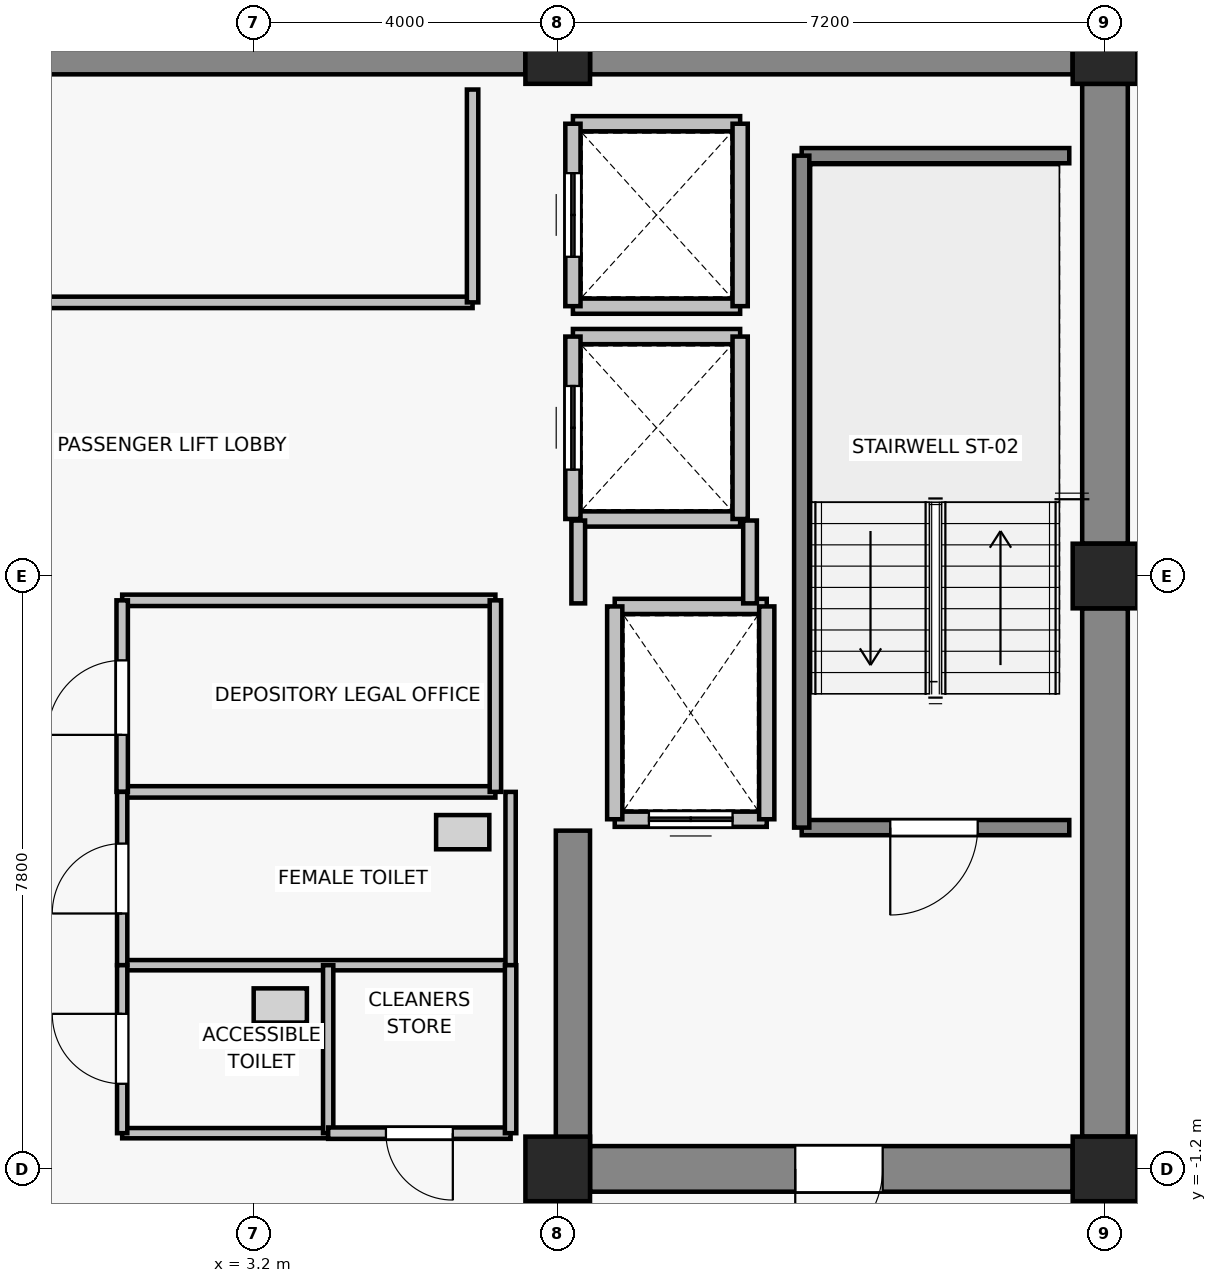
"""IFC4 building model, lengths in metres.
Left out: names, types, materials, properties, quantities, classifications, styles, units other than length and angle.
Written with IfcOpenShell. Run it as: python <this file> out.ifc"""

import sys

from ifc_helpers import new_model, si_unit, direction, frame, frame_2d, origin, origin_2d, place, context, subcontext, project, spatial, rectangle, extrude, source, transform, mapped, element, fill, save


model = new_model("IFC4")
c1 = context("Model", 3, precision=1e-05, world=origin(), true_north=direction((0.0, 1.0)))
c2 = subcontext(c1, "Body", "Model", "MODEL_VIEW")
j1 = project(units=[si_unit("LENGTHUNIT", "METRE"), si_unit("PLANEANGLEUNIT", "RADIAN")], contexts=[c1])
p1 = place(None, origin())
s1 = spatial("IfcSite", under=j1, at=p1, CompositionType="ELEMENT")
p2 = place(p1, origin())
s2 = spatial("IfcBuilding", under=s1, at=p2, CompositionType="ELEMENT")
p3 = place(p2, frame((0.0, 0.0, 265.0)))
s3 = spatial("IfcBuildingStorey", under=s2, at=p3, CompositionType="ELEMENT", Elevation=265.0)
for number, where, z_axis, x_axis in (
    (1, (7.2, -1.2, 0.0), (0.0, 0.0, 1.0), (1.0, 0.0, 0.0)),
    (2, (14.4, -1.2, 0.0), (0.0, 0.0, 1.0), (1.0, 0.0, 0.0)),
    (3, (14.4, 6.6, 0.0), (0.0, 0.0, 1.0), (1.0, 0.0, 0.0)),
    (4, (7.2, 13.5, 0.0), (0.0, 0.0, 1.0), (1.0, 0.0, 0.0)),
    (5, (14.4, 13.5, 0.0), (0.0, 0.0, 1.0), (1.0, 0.0, 0.0)),
):
    element("IfcColumn", number, at=place(p3, frame(where, z_axis=z_axis, x_axis=x_axis)), inside=s3, PredefinedType="COLUMN", context=c2, shape_type="SweptSolid", body=[
        extrude(rectangle(XDim=0.85, YDim=0.85, at=origin_2d()), origin(), (0.0, 0.0, 1.0), 3.3),
    ])
p4 = place(p3, frame((-6.775, 13.5, 0.0), z_axis=(0.0, 0.0, 1.0), x_axis=(1.0, 0.0, 0.0)))
e6 = element("IfcWall", 6, at=p4, inside=s3, PredefinedType="SHEAR", context=c2, shape_type="SweptSolid", body=[
    extrude(rectangle(XDim=13.55, YDim=0.6, at=frame_2d((6.775, 0.0))), origin(), (0.0, 0.0, 1.0), 3.075),
])
p5 = place(p3, frame((7.625, 13.5, 0.0), z_axis=(0.0, 0.0, 1.0), x_axis=(1.0, 0.0, 0.0)))
e7 = element("IfcWall", 7, at=p5, inside=s3, PredefinedType="SHEAR", context=c2, shape_type="SweptSolid", body=[
    extrude(rectangle(XDim=6.35, YDim=0.6, at=frame_2d((3.175, 0.0))), origin(), (0.0, 0.0, 1.0), 3.075),
])
p6 = place(p3, frame((14.4, -0.775, 0.0), z_axis=(0.0, 0.0, 1.0), x_axis=(0.0, 1.0, 0.0)))
e8 = element("IfcWall", 8, at=p6, inside=s3, PredefinedType="SHEAR", context=c2, shape_type="SweptSolid", body=[
    extrude(rectangle(XDim=6.95, YDim=0.6, at=frame_2d((3.475, 0.0))), origin(), (0.0, 0.0, 1.0), 3.075),
])
p7 = place(p3, frame((14.4, 7.025, 0.0), z_axis=(0.0, 0.0, 1.0), x_axis=(0.0, 1.0, 0.0)))
e9 = element("IfcWall", 9, at=p7, inside=s3, PredefinedType="SHEAR", context=c2, shape_type="SweptSolid", body=[
    extrude(rectangle(XDim=6.05, YDim=0.6, at=frame_2d((3.025, 0.0))), origin(), (0.0, 0.0, 1.0), 3.075),
])
p8 = place(p3, frame((13.975, -1.2, 0.0), z_axis=(0.0, 0.0, 1.0), x_axis=(-1.0, 0.0, 0.0)))
e10 = element("IfcWall", 10, at=p8, inside=s3, PredefinedType="SHEAR", context=c2, shape_type="SweptSolid", body=[
    extrude(rectangle(XDim=6.35, YDim=0.6, at=frame_2d((3.175, 0.0))), origin(), (0.0, 0.0, 1.0), 3.075),
])
p9 = place(p8, frame((2.5, 0.0, 0.0)))
e11 = element("IfcOpeningElement", 11, at=p9, cuts=e10, PredefinedType="OPENING", context=c2, shape_type="SweptSolid", body=[
    extrude(rectangle(XDim=1.15, YDim=2.15, at=frame_2d((0.575, 1.075))), frame((0.0, 0.31, 0.0), z_axis=(0.0, -1.0, 0.0), x_axis=(1.0, 0.0, 0.0)), (0.0, 0.0, 1.0), 0.62),
])
p10 = place(p3, frame((7.4, -0.9, 0.0), z_axis=(0.0, 0.0, 1.0), x_axis=(0.0, 1.0, 0.0)))
e12 = element("IfcWall", 12, at=p10, inside=s3, PredefinedType="SHEAR", context=c2, shape_type="SweptSolid", body=[
    extrude(rectangle(XDim=4.15, YDim=0.45, at=frame_2d((2.075, 0.0))), origin(), (0.0, 0.0, 1.0), 3.075),
])
p11 = place(p3, frame((9.95, 3.4, 0.0), z_axis=(0.0, 0.0, 1.0), x_axis=(-1.0, 0.0, 0.0)))
e13 = element("IfcWall", 13, at=p11, inside=s3, PredefinedType="SOLIDWALL", context=c2, shape_type="SweptSolid", body=[
    extrude(rectangle(XDim=2.0, YDim=0.2, at=frame_2d((1.0, 0.0))), origin(), (0.0, 0.0, 1.0), 3.075),
])
p12 = place(p11, frame((0.45, 0.0, 0.0)))
e14 = element("IfcOpeningElement", 14, at=p12, cuts=e13, PredefinedType="OPENING", context=c2, shape_type="SweptSolid", body=[
    extrude(rectangle(XDim=1.1, YDim=2.2, at=frame_2d((0.55, 1.1))), frame((0.0, 0.11, 0.0), z_axis=(0.0, -1.0, 0.0), x_axis=(1.0, 0.0, 0.0)), (0.0, 0.0, 1.0), 0.22),
])
p13 = place(p3, frame((7.95, 6.2, 0.0), z_axis=(0.0, 0.0, 1.0), x_axis=(1.0, 0.0, 0.0)))
e15 = element("IfcWall", 15, at=p13, inside=s3, PredefinedType="SOLIDWALL", context=c2, shape_type="SweptSolid", body=[
    extrude(rectangle(XDim=2.0, YDim=0.2, at=frame_2d((1.0, 0.0))), origin(), (0.0, 0.0, 1.0), 3.075),
])
for number, where, z_axis, x_axis in (
    (16, (7.95, 3.4, 0.0), (0.0, 0.0, 1.0), (0.0, 1.0, 0.0)),
    (17, (9.95, 6.2, 0.0), (0.0, 0.0, 1.0), (0.0, -1.0, 0.0)),
):
    element("IfcWall", number, at=place(p3, frame(where, z_axis=z_axis, x_axis=x_axis)), inside=s3, PredefinedType="SOLIDWALL", context=c2, shape_type="SweptSolid", body=[
        extrude(rectangle(XDim=2.8, YDim=0.2, at=frame_2d((1.4, 0.0))), origin(), (0.0, 0.0, 1.0), 3.075),
    ])
for number, where, z_axis, x_axis in (
    (18, (9.6, 7.35, 0.0), (0.0, 0.0, 1.0), (-1.0, 0.0, 0.0)),
    (19, (7.4, 9.75, 0.0), (0.0, 0.0, 1.0), (1.0, 0.0, 0.0)),
):
    element("IfcWall", number, at=place(p3, frame(where, z_axis=z_axis, x_axis=x_axis)), inside=s3, PredefinedType="SOLIDWALL", context=c2, shape_type="SweptSolid", body=[
        extrude(rectangle(XDim=2.2, YDim=0.2, at=frame_2d((1.1, 0.0))), origin(), (0.0, 0.0, 1.0), 2.615),
    ])
p14 = place(p3, frame((7.4, 7.35, 0.0), z_axis=(0.0, 0.0, 1.0), x_axis=(0.0, 1.0, 0.0)))
e20 = element("IfcWall", 20, at=p14, inside=s3, PredefinedType="SOLIDWALL", context=c2, shape_type="SweptSolid", body=[
    extrude(rectangle(XDim=2.4, YDim=0.2, at=frame_2d((1.2, 0.0))), origin(), (0.0, 0.0, 1.0), 2.615),
])
p15 = place(p14, frame((0.65, 0.0, 0.0)))
e21 = element("IfcOpeningElement", 21, at=p15, cuts=e20, PredefinedType="OPENING", context=c2, shape_type="SweptSolid", body=[
    extrude(rectangle(XDim=1.1, YDim=2.2, at=frame_2d((0.55, 1.1))), frame((0.0, 0.11, 0.0), z_axis=(0.0, -1.0, 0.0), x_axis=(1.0, 0.0, 0.0)), (0.0, 0.0, 1.0), 0.22),
])
p16 = place(p3, frame((9.6, 9.75, 0.0), z_axis=(0.0, 0.0, 1.0), x_axis=(0.0, -1.0, 0.0)))
e22 = element("IfcWall", 22, at=p16, inside=s3, PredefinedType="SOLIDWALL", context=c2, shape_type="SweptSolid", body=[
    extrude(rectangle(XDim=2.4, YDim=0.2, at=frame_2d((1.2, 0.0))), origin(), (0.0, 0.0, 1.0), 3.075),
])
for number, where, z_axis, x_axis in (
    (23, (9.6, 10.15, 0.0), (0.0, 0.0, 1.0), (-1.0, 0.0, 0.0)),
    (24, (7.4, 12.55, 0.0), (0.0, 0.0, 1.0), (1.0, 0.0, 0.0)),
):
    element("IfcWall", number, at=place(p3, frame(where, z_axis=z_axis, x_axis=x_axis)), inside=s3, PredefinedType="SOLIDWALL", context=c2, shape_type="SweptSolid", body=[
        extrude(rectangle(XDim=2.2, YDim=0.2, at=frame_2d((1.1, 0.0))), origin(), (0.0, 0.0, 1.0), 2.615),
    ])
p17 = place(p3, frame((7.4, 10.15, 0.0), z_axis=(0.0, 0.0, 1.0), x_axis=(0.0, 1.0, 0.0)))
e25 = element("IfcWall", 25, at=p17, inside=s3, PredefinedType="SOLIDWALL", context=c2, shape_type="SweptSolid", body=[
    extrude(rectangle(XDim=2.4, YDim=0.2, at=frame_2d((1.2, 0.0))), origin(), (0.0, 0.0, 1.0), 2.615),
])
p18 = place(p17, frame((0.65, 0.0, 0.0)))
e26 = element("IfcOpeningElement", 26, at=p18, cuts=e25, PredefinedType="OPENING", context=c2, shape_type="SweptSolid", body=[
    extrude(rectangle(XDim=1.1, YDim=2.2, at=frame_2d((0.55, 1.1))), frame((0.0, 0.11, 0.0), z_axis=(0.0, -1.0, 0.0), x_axis=(1.0, 0.0, 0.0)), (0.0, 0.0, 1.0), 0.22),
])
p19 = place(p3, frame((9.6, 12.55, 0.0), z_axis=(0.0, 0.0, 1.0), x_axis=(0.0, -1.0, 0.0)))
e27 = element("IfcWall", 27, at=p19, inside=s3, PredefinedType="SOLIDWALL", context=c2, shape_type="SweptSolid", body=[
    extrude(rectangle(XDim=2.4, YDim=0.2, at=frame_2d((1.2, 0.0))), origin(), (0.0, 0.0, 1.0), 3.075),
])
p20 = place(p3, frame((13.93, 3.29, 0.0), z_axis=(0.0, 0.0, 1.0), x_axis=(-1.0, 0.0, 0.0)))
e28 = element("IfcWall", 28, at=p20, inside=s3, PredefinedType="SOLIDWALL", context=c2, shape_type="SweptSolid", body=[
    extrude(rectangle(XDim=3.52, YDim=0.2, at=frame_2d((1.76, 0.0))), origin(), (0.0, 0.0, 1.0), 3.075),
])
p21 = place(p20, frame((1.205, 0.0, 0.0)))
e29 = element("IfcOpeningElement", 29, at=p21, cuts=e28, PredefinedType="OPENING", context=c2, shape_type="SweptSolid", body=[
    extrude(rectangle(XDim=1.15, YDim=2.15, at=frame_2d((0.575, 1.075))), frame((0.0, 0.11, 0.0), z_axis=(0.0, -1.0, 0.0), x_axis=(1.0, 0.0, 0.0)), (0.0, 0.0, 1.0), 0.22),
])
p22 = place(p3, frame((10.41, 12.13, 0.0), z_axis=(0.0, 0.0, 1.0), x_axis=(1.0, 0.0, 0.0)))
e30 = element("IfcWall", 30, at=p22, inside=s3, PredefinedType="SOLIDWALL", context=c2, shape_type="SweptSolid", body=[
    extrude(rectangle(XDim=3.52, YDim=0.2, at=frame_2d((1.76, 0.0))), origin(), (0.0, 0.0, 1.0), 3.075),
])
p23 = place(p3, frame((10.41, 3.29, 0.0), z_axis=(0.0, 0.0, 1.0), x_axis=(0.0, 1.0, 0.0)))
e31 = element("IfcWall", 31, at=p23, inside=s3, PredefinedType="SOLIDWALL", context=c2, shape_type="SweptSolid", body=[
    extrude(rectangle(XDim=8.84, YDim=0.2, at=frame_2d((4.42, 0.0))), origin(), (0.0, 0.0, 1.0), 3.075),
])
p24 = place(p3, frame((7.47, 6.24, 0.0), z_axis=(0.0, 0.0, 1.0), x_axis=(0.0, 1.0, 0.0)))
e32 = element("IfcWall", 32, at=p24, inside=s3, PredefinedType="PARTITIONING", context=c2, shape_type="SweptSolid", body=[
    extrude(rectangle(XDim=1.09, YDim=0.18, at=frame_2d((0.545, 0.0))), origin(), (0.0, 0.0, 1.0), 2.615),
])
p25 = place(p3, frame((9.73, 7.33, 0.0), z_axis=(0.0, 0.0, 1.0), x_axis=(0.0, -1.0, 0.0)))
e33 = element("IfcWall", 33, at=p25, inside=s3, PredefinedType="PARTITIONING", context=c2, shape_type="SweptSolid", body=[
    extrude(rectangle(XDim=1.09, YDim=0.18, at=frame_2d((0.545, 0.0))), origin(), (0.0, 0.0, 1.0), 3.075),
])
p26 = place(p3, frame((6.08, 10.2, 0.0), z_axis=(0.0, 0.0, 1.0), x_axis=(-1.0, 0.0, 0.0)))
e34 = element("IfcWall", 34, at=p26, inside=s3, PredefinedType="PARTITIONING", context=c2, shape_type="SweptSolid", body=[
    extrude(rectangle(XDim=12.16, YDim=0.15, at=frame_2d((6.08, 0.0))), origin(), (0.0, 0.0, 1.0), 3.075),
])
p27 = place(p26, frame((7.005, 0.0, 0.0)))
e35 = element("IfcOpeningElement", 35, at=p27, cuts=e34, PredefinedType="OPENING", context=c2, shape_type="SweptSolid", body=[
    extrude(rectangle(XDim=1.15, YDim=2.15, at=frame_2d((0.575, 1.075))), frame((0.0, 0.085, 0.0), z_axis=(0.0, -1.0, 0.0), x_axis=(1.0, 0.0, 0.0)), (0.0, 0.0, 1.0), 0.17),
])
p28 = place(p3, frame((6.08, 13.0, 0.0), z_axis=(0.0, 0.0, 1.0), x_axis=(0.0, -1.0, 0.0)))
e36 = element("IfcWall", 36, at=p28, inside=s3, PredefinedType="PARTITIONING", context=c2, shape_type="SweptSolid", body=[
    extrude(rectangle(XDim=2.8, YDim=0.15, at=frame_2d((1.4, 0.0))), origin(), (0.0, 0.0, 1.0), 3.075),
])
for number, where, z_axis, x_axis in (
    (37, (6.38, 3.76, 0.0), (0.0, 0.0, 1.0), (-1.0, 0.0, 0.0)),
    (38, (1.47, 6.28, 0.0), (0.0, 0.0, 1.0), (1.0, 0.0, 0.0)),
):
    element("IfcWall", number, at=place(p3, frame(where, z_axis=z_axis, x_axis=x_axis)), inside=s3, PredefinedType="PARTITIONING", context=c2, shape_type="SweptSolid", body=[
        extrude(rectangle(XDim=4.91, YDim=0.15, at=frame_2d((2.455, 0.0))), origin(), (0.0, 0.0, 1.0), 3.075),
    ])
p29 = place(p3, frame((1.47, 3.76, 0.0), z_axis=(0.0, 0.0, 1.0), x_axis=(0.0, 1.0, 0.0)))
e39 = element("IfcWall", 39, at=p29, inside=s3, PredefinedType="PARTITIONING", context=c2, shape_type="SweptSolid", body=[
    extrude(rectangle(XDim=2.52, YDim=0.15, at=frame_2d((1.26, 0.0))), origin(), (0.0, 0.0, 1.0), 3.075),
])
p30 = place(p29, frame((0.75, 0.0, 0.0)))
e40 = element("IfcOpeningElement", 40, at=p30, cuts=e39, PredefinedType="OPENING", context=c2, shape_type="SweptSolid", body=[
    extrude(rectangle(XDim=0.98, YDim=2.15, at=frame_2d((0.49, 1.075))), frame((0.0, 0.085, 0.0), z_axis=(0.0, -1.0, 0.0), x_axis=(1.0, 0.0, 0.0)), (0.0, 0.0, 1.0), 0.17),
])
p31 = place(p3, frame((6.38, 6.28, 0.0), z_axis=(0.0, 0.0, 1.0), x_axis=(0.0, -1.0, 0.0)))
e41 = element("IfcWall", 41, at=p31, inside=s3, PredefinedType="PARTITIONING", context=c2, shape_type="SweptSolid", body=[
    extrude(rectangle(XDim=2.52, YDim=0.15, at=frame_2d((1.26, 0.0))), origin(), (0.0, 0.0, 1.0), 3.075),
])
p32 = place(p3, frame((6.58, 1.48, 0.0), z_axis=(0.0, 0.0, 1.0), x_axis=(-1.0, 0.0, 0.0)))
e42 = element("IfcWall", 42, at=p32, inside=s3, PredefinedType="PARTITIONING", context=c2, shape_type="SweptSolid", body=[
    extrude(rectangle(XDim=5.11, YDim=0.135, at=frame_2d((2.555, 0.0))), origin(), (0.0, 0.0, 1.0), 3.075),
])
p33 = place(p3, frame((1.47, 1.48, 0.0), z_axis=(0.0, 0.0, 1.0), x_axis=(0.0, 1.0, 0.0)))
e43 = element("IfcWall", 43, at=p33, inside=s3, PredefinedType="PARTITIONING", context=c2, shape_type="SweptSolid", body=[
    extrude(rectangle(XDim=2.28, YDim=0.135, at=frame_2d((1.14, 0.0))), origin(), (0.0, 0.0, 1.0), 3.075),
])
p34 = place(p33, frame((0.68, 0.0, 0.0)))
e44 = element("IfcOpeningElement", 44, at=p34, cuts=e43, PredefinedType="OPENING", context=c2, shape_type="SweptSolid", body=[
    extrude(rectangle(XDim=0.92, YDim=2.1, at=frame_2d((0.46, 1.05))), frame((0.0, 0.077, 0.0), z_axis=(0.0, -1.0, 0.0), x_axis=(1.0, 0.0, 0.0)), (0.0, 0.0, 1.0), 0.155),
])
p35 = place(p3, frame((6.58, 3.76, 0.0), z_axis=(0.0, 0.0, 1.0), x_axis=(0.0, -1.0, 0.0)))
e45 = element("IfcWall", 45, at=p35, inside=s3, PredefinedType="PARTITIONING", context=c2, shape_type="SweptSolid", body=[
    extrude(rectangle(XDim=2.28, YDim=0.135, at=frame_2d((1.14, 0.0))), origin(), (0.0, 0.0, 1.0), 3.075),
])
p36 = place(p3, frame((4.18, -0.73, 0.0), z_axis=(0.0, 0.0, 1.0), x_axis=(-1.0, 0.0, 0.0)))
e46 = element("IfcWall", 46, at=p36, inside=s3, PredefinedType="PARTITIONING", context=c2, shape_type="SweptSolid", body=[
    extrude(rectangle(XDim=2.71, YDim=0.135, at=frame_2d((1.355, 0.0))), origin(), (0.0, 0.0, 1.0), 3.075),
])
p37 = place(p3, frame((1.47, -0.73, 0.0), z_axis=(0.0, 0.0, 1.0), x_axis=(0.0, 1.0, 0.0)))
e47 = element("IfcWall", 47, at=p37, inside=s3, PredefinedType="PARTITIONING", context=c2, shape_type="SweptSolid", body=[
    extrude(rectangle(XDim=2.21, YDim=0.135, at=frame_2d((1.105, 0.0))), origin(), (0.0, 0.0, 1.0), 3.075),
])
p38 = place(p37, frame((0.65, 0.0, 0.0)))
e48 = element("IfcOpeningElement", 48, at=p38, cuts=e47, PredefinedType="OPENING", context=c2, shape_type="SweptSolid", body=[
    extrude(rectangle(XDim=0.92, YDim=2.1, at=frame_2d((0.46, 1.05))), frame((0.0, 0.077, 0.0), z_axis=(0.0, -1.0, 0.0), x_axis=(1.0, 0.0, 0.0)), (0.0, 0.0, 1.0), 0.155),
])
p39 = place(p3, frame((4.18, 1.48, 0.0), z_axis=(0.0, 0.0, 1.0), x_axis=(0.0, -1.0, 0.0)))
e49 = element("IfcWall", 49, at=p39, inside=s3, PredefinedType="PARTITIONING", context=c2, shape_type="SweptSolid", body=[
    extrude(rectangle(XDim=2.21, YDim=0.135, at=frame_2d((1.105, 0.0))), origin(), (0.0, 0.0, 1.0), 3.075),
])
p40 = place(p3, frame((6.58, -0.73, 0.0), z_axis=(0.0, 0.0, 1.0), x_axis=(-1.0, 0.0, 0.0)))
e50 = element("IfcWall", 50, at=p40, inside=s3, PredefinedType="PARTITIONING", context=c2, shape_type="SweptSolid", body=[
    extrude(rectangle(XDim=2.4, YDim=0.15, at=frame_2d((1.2, 0.0))), origin(), (0.0, 0.0, 1.0), 3.075),
])
p41 = place(p40, frame((0.76, 0.0, 0.0)))
e51 = element("IfcOpeningElement", 51, at=p41, cuts=e50, PredefinedType="OPENING", context=c2, shape_type="SweptSolid", body=[
    extrude(rectangle(XDim=0.88, YDim=2.1, at=frame_2d((0.44, 1.05))), frame((0.0, 0.085, 0.0), z_axis=(0.0, -1.0, 0.0), x_axis=(1.0, 0.0, 0.0)), (0.0, 0.0, 1.0), 0.17),
])
p42 = place(p3, frame((6.58, 1.48, 0.0), z_axis=(0.0, 0.0, 1.0), x_axis=(0.0, -1.0, 0.0)))
e52 = element("IfcWall", 52, at=p42, inside=s3, PredefinedType="PARTITIONING", context=c2, shape_type="SweptSolid", body=[
    extrude(rectangle(XDim=2.21, YDim=0.15, at=frame_2d((1.105, 0.0))), origin(), (0.0, 0.0, 1.0), 3.075),
])
m1 = source(origin(), c2, "Body", "SweptSolid", [
    extrude(rectangle(XDim=1.1, YDim=2.2, at=frame_2d((0.55, 1.1))), frame((0.0, 0.025, 0.0), z_axis=(0.0, -1.0, 0.0), x_axis=(1.0, 0.0, 0.0)), (0.0, 0.0, 1.0), 0.05),
])
p43 = place(p12, origin())
e53 = element("IfcDoor", 53, at=p43, inside=s3, OperationType="DOUBLE_DOOR_SLIDING", PredefinedType="DOOR", context=c2, shape_type="MappedRepresentation", body=[
    mapped(m1, transform((0.0, 0.0, 0.0), x_axis=(1.0, 0.0, 0.0), y_axis=(0.0, 1.0, 0.0), z_axis=(0.0, 0.0, 1.0), scale=1.0)),
])
fill(e14, e53)
p44 = place(p15, origin())
e54 = element("IfcDoor", 54, at=p44, inside=s3, OperationType="DOUBLE_DOOR_SLIDING", PredefinedType="DOOR", context=c2, shape_type="MappedRepresentation", body=[
    mapped(m1, transform((0.0, 0.0, 0.0), x_axis=(1.0, 0.0, 0.0), y_axis=(0.0, 1.0, 0.0), z_axis=(0.0, 0.0, 1.0), scale=1.0)),
])
fill(e21, e54)
p45 = place(p18, origin())
e55 = element("IfcDoor", 55, at=p45, inside=s3, OperationType="DOUBLE_DOOR_SLIDING", PredefinedType="DOOR", context=c2, shape_type="MappedRepresentation", body=[
    mapped(m1, transform((0.0, 0.0, 0.0), x_axis=(1.0, 0.0, 0.0), y_axis=(0.0, 1.0, 0.0), z_axis=(0.0, 0.0, 1.0), scale=1.0)),
])
fill(e26, e55)
m2 = source(origin(), c2, "Body", "SweptSolid", [
    extrude(rectangle(XDim=1.15, YDim=2.15, at=frame_2d((0.575, 1.075))), frame((0.0, 0.025, 0.0), z_axis=(0.0, -1.0, 0.0), x_axis=(1.0, 0.0, 0.0)), (0.0, 0.0, 1.0), 0.05),
])
p46 = place(p21, origin())
e56 = element("IfcDoor", 56, at=p46, inside=s3, OperationType="SINGLE_SWING_RIGHT", PredefinedType="DOOR", context=c2, shape_type="MappedRepresentation", body=[
    mapped(m2, transform((0.0, 0.0, 0.0), x_axis=(1.0, 0.0, 0.0), y_axis=(0.0, 1.0, 0.0), z_axis=(0.0, 0.0, 1.0), scale=1.0)),
])
fill(e29, e56)
p47 = place(p9, origin())
e57 = element("IfcDoor", 57, at=p47, inside=s3, OperationType="SINGLE_SWING_RIGHT", PredefinedType="DOOR", context=c2, shape_type="MappedRepresentation", body=[
    mapped(m2, transform((0.0, 0.0, 0.0), x_axis=(1.0, 0.0, 0.0), y_axis=(0.0, 1.0, 0.0), z_axis=(0.0, 0.0, 1.0), scale=1.0)),
])
fill(e11, e57)
m3 = source(origin(), c2, "Body", "SweptSolid", [
    extrude(rectangle(XDim=0.98, YDim=2.15, at=frame_2d((0.49, 1.075))), frame((0.0, 0.025, 0.0), z_axis=(0.0, -1.0, 0.0), x_axis=(1.0, 0.0, 0.0)), (0.0, 0.0, 1.0), 0.05),
])
p48 = place(p30, origin())
e58 = element("IfcDoor", 58, at=p48, inside=s3, OperationType="SINGLE_SWING_LEFT", PredefinedType="DOOR", context=c2, shape_type="MappedRepresentation", body=[
    mapped(m3, transform((0.0, 0.0, 0.0), x_axis=(1.0, 0.0, 0.0), y_axis=(0.0, 1.0, 0.0), z_axis=(0.0, 0.0, 1.0), scale=1.0)),
])
fill(e40, e58)
m4 = source(origin(), c2, "Body", "SweptSolid", [
    extrude(rectangle(XDim=0.92, YDim=2.1, at=frame_2d((0.46, 1.05))), frame((0.0, 0.025, 0.0), z_axis=(0.0, -1.0, 0.0), x_axis=(1.0, 0.0, 0.0)), (0.0, 0.0, 1.0), 0.05),
])
p49 = place(p34, origin())
e59 = element("IfcDoor", 59, at=p49, inside=s3, OperationType="SINGLE_SWING_LEFT", PredefinedType="DOOR", context=c2, shape_type="MappedRepresentation", body=[
    mapped(m4, transform((0.0, 0.0, 0.0), x_axis=(1.0, 0.0, 0.0), y_axis=(0.0, 1.0, 0.0), z_axis=(0.0, 0.0, 1.0), scale=1.0)),
])
fill(e44, e59)
p50 = place(p38, origin())
e60 = element("IfcDoor", 60, at=p50, inside=s3, OperationType="SINGLE_SWING_RIGHT", PredefinedType="DOOR", context=c2, shape_type="MappedRepresentation", body=[
    mapped(m4, transform((0.0, 0.0, 0.0), x_axis=(1.0, 0.0, 0.0), y_axis=(0.0, 1.0, 0.0), z_axis=(0.0, 0.0, 1.0), scale=1.0)),
])
fill(e48, e60)
m5 = source(origin(), c2, "Body", "SweptSolid", [
    extrude(rectangle(XDim=0.88, YDim=2.1, at=frame_2d((0.44, 1.05))), frame((0.0, 0.025, 0.0), z_axis=(0.0, -1.0, 0.0), x_axis=(1.0, 0.0, 0.0)), (0.0, 0.0, 1.0), 0.05),
])
p51 = place(p41, origin())
e61 = element("IfcDoor", 61, at=p51, inside=s3, OperationType="SINGLE_SWING_LEFT", PredefinedType="DOOR", context=c2, shape_type="MappedRepresentation", body=[
    mapped(m5, transform((0.0, 0.0, 0.0), x_axis=(1.0, 0.0, 0.0), y_axis=(0.0, 1.0, 0.0), z_axis=(0.0, 0.0, 1.0), scale=1.0)),
])
fill(e51, e61)
save(model, sys.argv[1])
